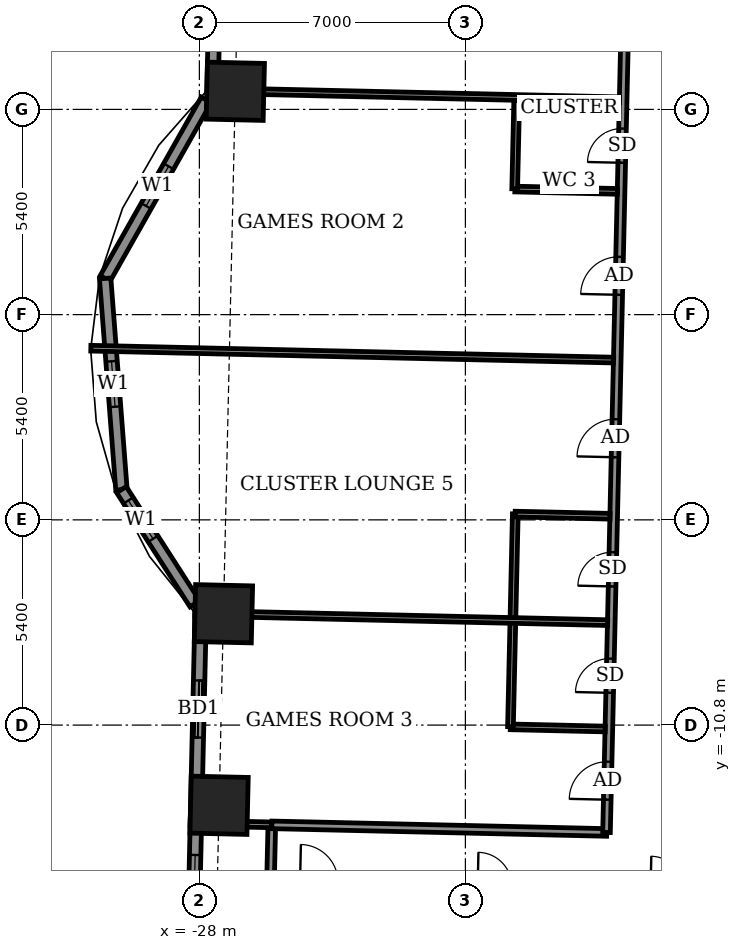
"""IFC4 building model, lengths in metres.
Left out: names, types, materials, properties, quantities, classifications, styles, units other than length and angle.
Written with IfcOpenShell. Run it as: python <this file> out.ifc"""

import sys

from ifc_helpers import new_model, si_unit, direction, frame, frame_2d, origin, origin_2d, place, context, subcontext, project, spatial, rectangle, extrude, element, fill, save


model = new_model("IFC4")
c1 = context("Model", 3, precision=1e-05, world=origin(), true_north=direction((0.0, 1.0)))
c2 = subcontext(c1, "Body", "Model", "MODEL_VIEW")
j1 = project(units=[si_unit("LENGTHUNIT", "METRE"), si_unit("PLANEANGLEUNIT", "RADIAN")], contexts=[c1])
p1 = place(None, origin())
s1 = spatial("IfcSite", under=j1, at=p1, CompositionType="ELEMENT")
p2 = place(p1, origin())
s2 = spatial("IfcBuilding", under=s1, at=p2, CompositionType="ELEMENT")
p3 = place(p2, frame((0.0, 0.0, 56.7)))
s3 = spatial("IfcBuildingStorey", under=s2, at=p3, CompositionType="ELEMENT", Elevation=56.7)
for number, where, z_axis, x_axis in (
    (1, (-27.366, -7.87, -0.55), (0.0, 0.0, 1.0), (-0.023, -1.0, 0.0)),
    (2, (-27.481, -12.91, -0.55), (0.0, 0.0, 1.0), (-0.023, -1.0, 0.0)),
    (3, (-27.054, 5.877, -0.55), (0.0, 0.0, 1.0), (-0.023, -1.0, 0.0)),
):
    element("IfcColumn", number, at=place(p3, frame(where, z_axis=z_axis, x_axis=x_axis)), inside=s3, PredefinedType="COLUMN", context=c2, shape_type="SweptSolid", body=[
        extrude(rectangle(XDim=1.5, YDim=1.5, at=origin_2d()), origin(), (0.0, 0.0, 1.0), 3.6),
    ])
p4 = place(p3, frame((-27.324, 20.462, 0.0), z_axis=(0.0, 0.0, 1.0), x_axis=(-0.022695628174, -0.999742421057, 0.0)))
e4 = element("IfcWall", 4, at=p4, inside=s3, PredefinedType="SOLIDWALL", context=c2, shape_type="SweptSolid", body=[
    extrude(rectangle(XDim=14.63, YDim=0.3, at=frame_2d((7.315, 0.0))), origin(), (0.0, 0.0, 1.0), 3.05),
])
p5 = place(p4, frame((3.13, 0.0, 0.0)))
e5 = element("IfcOpeningElement", 5, at=p5, cuts=e4, PredefinedType="OPENING", context=c2, shape_type="SweptSolid", body=[
    extrude(rectangle(XDim=1.5, YDim=2.4, at=frame_2d((0.75, 1.2))), frame((0.0, 0.16, 0.0), z_axis=(0.0, -1.0, 0.0), x_axis=(1.0, 0.0, 0.0)), (0.0, 0.0, 1.0), 0.32),
])
p6 = place(p4, frame((9.694, 0.0, 0.9)))
e6 = element("IfcOpeningElement", 6, at=p6, cuts=e4, PredefinedType="OPENING", context=c2, shape_type="SweptSolid", body=[
    extrude(rectangle(XDim=2.4, YDim=1.5, at=frame_2d((1.2, 0.75))), frame((0.0, 0.16, 0.0), z_axis=(0.0, -1.0, 0.0), x_axis=(1.0, 0.0, 0.0)), (0.0, 0.0, 1.0), 0.32),
])
p7 = place(p3, frame((-27.82, 5.65, 0.0), z_axis=(0.0, 0.0, 1.0), x_axis=(-0.492554919955, -0.870281363025, 0.0)))
e7 = element("IfcWall", 7, at=p7, inside=s3, PredefinedType="SOLIDWALL", context=c2, shape_type="SweptSolid", body=[
    extrude(rectangle(XDim=5.398, YDim=0.3, at=frame_2d((2.699, 0.0))), origin(), (0.0, 0.0, 1.0), 3.05),
])
p8 = place(p7, frame((2.008, 0.0, 0.9)))
e8 = element("IfcOpeningElement", 8, at=p8, cuts=e7, PredefinedType="OPENING", context=c2, shape_type="SweptSolid", body=[
    extrude(rectangle(XDim=1.2, YDim=1.5, at=frame_2d((0.6, 0.75))), frame((0.0, 0.16, 0.0), z_axis=(0.0, -1.0, 0.0), x_axis=(1.0, 0.0, 0.0)), (0.0, 0.0, 1.0), 0.32),
])
p9 = place(p3, frame((-30.479, 0.952, 0.0), z_axis=(0.0, 0.0, 1.0), x_axis=(0.076964476481, -0.997033835614, 0.0)))
e9 = element("IfcWall", 9, at=p9, inside=s3, PredefinedType="SOLIDWALL", context=c2, shape_type="SweptSolid", body=[
    extrude(rectangle(XDim=5.573, YDim=0.3, at=frame_2d((2.787, 0.0))), origin(), (0.0, 0.0, 1.0), 3.05),
])
p10 = place(p9, frame((2.186, 0.0, 0.9)))
e10 = element("IfcOpeningElement", 10, at=p10, cuts=e9, PredefinedType="OPENING", context=c2, shape_type="SweptSolid", body=[
    extrude(rectangle(XDim=1.2, YDim=1.5, at=frame_2d((0.6, 0.75))), frame((0.0, 0.16, 0.0), z_axis=(0.0, -1.0, 0.0), x_axis=(1.0, 0.0, 0.0)), (0.0, 0.0, 1.0), 0.32),
])
p11 = place(p3, frame((-30.05, -4.605, 0.0), z_axis=(0.0, 0.0, 1.0), x_axis=(0.540653885242, -0.841245134532, 0.0)))
e11 = element("IfcWall", 11, at=p11, inside=s3, PredefinedType="SOLIDWALL", context=c2, shape_type="SweptSolid", body=[
    extrude(rectangle(XDim=3.57, YDim=0.3, at=frame_2d((1.785, 0.0))), origin(), (0.0, 0.0, 1.0), 3.05),
])
p12 = place(p11, frame((0.338, 0.0, 0.9)))
e12 = element("IfcOpeningElement", 12, at=p12, cuts=e11, PredefinedType="OPENING", context=c2, shape_type="SweptSolid", body=[
    extrude(rectangle(XDim=1.2, YDim=1.5, at=frame_2d((0.6, 0.75))), frame((0.0, 0.16, 0.0), z_axis=(0.0, -1.0, 0.0), x_axis=(1.0, 0.0, 0.0)), (0.0, 0.0, 1.0), 0.32),
])
p13 = place(p3, frame((-27.965, -7.802, 0.0), z_axis=(0.0, 0.0, 1.0), x_axis=(-0.02267786199, -0.999742824218, 0.0)))
e13 = element("IfcWall", 13, at=p13, inside=s3, PredefinedType="SOLIDWALL", context=c2, shape_type="SweptSolid", body=[
    extrude(rectangle(XDim=15.029, YDim=0.3, at=frame_2d((7.514, 0.0))), origin(), (0.0, 0.0, 1.0), 3.05),
])
p14 = place(p13, frame((1.826, 0.0, 0.0)))
e14 = element("IfcOpeningElement", 14, at=p14, cuts=e13, PredefinedType="OPENING", context=c2, shape_type="SweptSolid", body=[
    extrude(rectangle(XDim=1.5, YDim=2.4, at=frame_2d((0.75, 1.2))), frame((0.0, 0.16, 0.0), z_axis=(0.0, -1.0, 0.0), x_axis=(1.0, 0.0, 0.0)), (0.0, 0.0, 1.0), 0.32),
])
p15 = place(p13, frame((6.417, 0.0, 0.9)))
e15 = element("IfcOpeningElement", 15, at=p15, cuts=e13, PredefinedType="OPENING", context=c2, shape_type="SweptSolid", body=[
    extrude(rectangle(XDim=2.4, YDim=1.5, at=frame_2d((1.2, 0.75))), frame((0.0, 0.16, 0.0), z_axis=(0.0, -1.0, 0.0), x_axis=(1.0, 0.0, 0.0)), (0.0, 0.0, 1.0), 0.32),
])
p16 = place(p3, frame((-30.413, 6.204, 0.0), z_axis=(0.0, 0.0, 1.0), x_axis=(0.022745736617, 0.999741282265, 0.0)))
e16 = element("IfcWall", 16, at=p16, inside=s3, PredefinedType="USERDEFINED", context=c2, shape_type="SweptSolid", body=[
    extrude(rectangle(XDim=3.875, YDim=0.55, at=frame_2d((1.938, 0.0))), origin(), (0.0, 0.0, 1.0), 0.8),
])
p17 = place(p3, frame((-30.915, -15.916, 0.0), z_axis=(0.0, 0.0, 1.0), x_axis=(0.022662255828, 0.999743178102, 0.0)))
e17 = element("IfcWall", 17, at=p17, inside=s3, PredefinedType="USERDEFINED", context=c2, shape_type="SweptSolid", body=[
    extrude(rectangle(XDim=6.0, YDim=0.55, at=frame_2d((3.0, 0.0))), origin(), (0.0, 0.0, 1.0), 0.8),
])
p18 = place(p3, frame((-26.128, -14.924, 0.0), z_axis=(0.0, 0.0, 1.0), x_axis=(0.022632637625, 0.99974384905, 0.0)))
e18 = element("IfcWall", 18, at=p18, inside=s3, PredefinedType="PARTITIONING", context=c2, shape_type="SweptSolid", body=[
    extrude(rectangle(XDim=1.5, YDim=0.2, at=frame_2d((0.75, 0.0))), origin(), (0.0, 0.0, 1.0), 3.05),
])
p19 = place(p3, frame((-28.242, -13.376, 0.0), z_axis=(0.0, 0.0, 1.0), x_axis=(0.999739603527, -0.022819402715, 0.0)))
e19 = element("IfcWall", 19, at=p19, inside=s3, PredefinedType="PARTITIONING", context=c2, shape_type="SweptSolid", body=[
    extrude(rectangle(XDim=2.15, YDim=0.15, at=frame_2d((1.075, 0.0))), origin(), (0.0, 0.0, 1.0), 3.05),
])
p20 = place(p3, frame((-26.092, -13.425, 0.0), z_axis=(0.0, 0.0, 1.0), x_axis=(0.999742550188, -0.022689939273, 0.0)))
e20 = element("IfcWall", 20, at=p20, inside=s3, PredefinedType="PARTITIONING", context=c2, shape_type="SweptSolid", body=[
    extrude(rectangle(XDim=8.812, YDim=0.2, at=frame_2d((4.406, 0.0))), origin(), (0.0, 0.0, 1.0), 3.05),
])
p21 = place(p3, frame((-17.287, -13.625, 0.0), z_axis=(0.0, 0.0, 1.0), x_axis=(0.022712214871, 0.999742044377, 0.0)))
e21 = element("IfcWall", 21, at=p21, inside=s3, PredefinedType="PARTITIONING", context=c2, shape_type="SweptSolid", body=[
    extrude(rectangle(XDim=26.551, YDim=0.2, at=frame_2d((13.275, 0.0))), origin(), (0.0, 0.0, 1.0), 3.05),
])
p22 = place(p21, frame((14.15, 0.0, 0.0)))
e22 = element("IfcOpeningElement", 22, at=p22, cuts=e21, PredefinedType="OPENING", context=c2, shape_type="SweptSolid", body=[
    extrude(rectangle(XDim=1.0, YDim=2.1, at=frame_2d((0.5, 1.05))), frame((0.0, 0.11, 0.0), z_axis=(0.0, -1.0, 0.0), x_axis=(1.0, 0.0, 0.0)), (0.0, 0.0, 1.0), 0.22),
])
p23 = place(p21, frame((17.625, 0.0, 0.0)))
e23 = element("IfcOpeningElement", 23, at=p23, cuts=e21, PredefinedType="OPENING", context=c2, shape_type="SweptSolid", body=[
    extrude(rectangle(XDim=0.9, YDim=2.1, at=frame_2d((0.45, 1.05))), frame((0.0, 0.11, 0.0), z_axis=(0.0, -1.0, 0.0), x_axis=(1.0, 0.0, 0.0)), (0.0, 0.0, 1.0), 0.22),
])
p24 = place(p21, frame((9.875, 0.0, 0.0)))
e24 = element("IfcOpeningElement", 24, at=p24, cuts=e21, PredefinedType="OPENING", context=c2, shape_type="SweptSolid", body=[
    extrude(rectangle(XDim=1.0, YDim=2.1, at=frame_2d((0.5, 1.05))), frame((0.0, 0.11, 0.0), z_axis=(0.0, -1.0, 0.0), x_axis=(1.0, 0.0, 0.0)), (0.0, 0.0, 1.0), 0.22),
])
p25 = place(p21, frame((6.475, 0.0, 0.0)))
e25 = element("IfcOpeningElement", 25, at=p25, cuts=e21, PredefinedType="OPENING", context=c2, shape_type="SweptSolid", body=[
    extrude(rectangle(XDim=0.9, YDim=2.1, at=frame_2d((0.45, 1.05))), frame((0.0, 0.11, 0.0), z_axis=(0.0, -1.0, 0.0), x_axis=(1.0, 0.0, 0.0)), (0.0, 0.0, 1.0), 0.22),
])
p26 = place(p21, frame((0.862, 0.0, 0.0)))
e26 = element("IfcOpeningElement", 26, at=p26, cuts=e21, PredefinedType="OPENING", context=c2, shape_type="SweptSolid", body=[
    extrude(rectangle(XDim=1.0, YDim=2.1, at=frame_2d((0.5, 1.05))), frame((0.0, 0.11, 0.0), z_axis=(0.0, -1.0, 0.0), x_axis=(1.0, 0.0, 0.0)), (0.0, 0.0, 1.0), 0.22),
])
p27 = place(p21, frame((3.675, 0.0, 0.0)))
e27 = element("IfcOpeningElement", 27, at=p27, cuts=e21, PredefinedType="OPENING", context=c2, shape_type="SweptSolid", body=[
    extrude(rectangle(XDim=0.9, YDim=2.1, at=frame_2d((0.45, 1.05))), frame((0.0, 0.11, 0.0), z_axis=(0.0, -1.0, 0.0), x_axis=(1.0, 0.0, 0.0)), (0.0, 0.0, 1.0), 0.22),
])
p28 = place(p3, frame((-19.819, -10.846, 0.0), z_axis=(0.0, 0.0, 1.0), x_axis=(0.999738801317, -0.022854521249, 0.0)))
e28 = element("IfcWall", 28, at=p28, inside=s3, PredefinedType="PARTITIONING", context=c2, shape_type="SweptSolid", body=[
    extrude(rectangle(XDim=2.5, YDim=0.15, at=frame_2d((1.25, 0.0))), origin(), (0.0, 0.0, 1.0), 3.05),
])
p29 = place(p3, frame((-19.814, -10.842, 0.0), z_axis=(0.0, 0.0, 1.0), x_axis=(0.022667933447, 0.999743049385, 0.0)))
e29 = element("IfcWall", 29, at=p29, inside=s3, PredefinedType="PARTITIONING", context=c2, shape_type="SweptSolid", body=[
    extrude(rectangle(XDim=5.601, YDim=0.15, at=frame_2d((2.8, 0.0))), origin(), (0.0, 0.0, 1.0), 3.05),
])
p30 = place(p3, frame((-28.116, -7.857, 0.0), z_axis=(0.0, 0.0, 1.0), x_axis=(0.999741301527, -0.022744890004, 0.0)))
e30 = element("IfcWall", 30, at=p30, inside=s3, PredefinedType="PARTITIONING", context=c2, shape_type="SweptSolid", body=[
    extrude(rectangle(XDim=10.863, YDim=0.15, at=frame_2d((5.431, 0.0))), origin(), (0.0, 0.0, 1.0), 3.05),
])
p31 = place(p3, frame((-19.692, -5.248, 0.0), z_axis=(0.0, 0.0, 1.0), x_axis=(0.999740977561, -0.022759125332, 0.0)))
e31 = element("IfcWall", 31, at=p31, inside=s3, PredefinedType="PARTITIONING", context=c2, shape_type="SweptSolid", body=[
    extrude(rectangle(XDim=2.5, YDim=0.15, at=frame_2d((1.25, 0.0))), origin(), (0.0, 0.0, 1.0), 3.05),
])
p32 = place(p3, frame((-30.856, -0.883, 0.0), z_axis=(0.0, 0.0, 1.0), x_axis=(0.999741248952, -0.022747200787, 0.0)))
e32 = element("IfcWall", 32, at=p32, inside=s3, PredefinedType="PARTITIONING", context=c2, shape_type="SweptSolid", body=[
    extrude(rectangle(XDim=13.76, YDim=0.15, at=frame_2d((6.88, 0.0))), origin(), (0.0, 0.0, 1.0), 2.1),
])
p33 = place(p3, frame((-19.698, 3.304, 0.0), z_axis=(0.0, 0.0, 1.0), x_axis=(0.999744396973, -0.02260842146, 0.0)))
e33 = element("IfcWall", 33, at=p33, inside=s3, PredefinedType="PARTITIONING", context=c2, shape_type="SweptSolid", body=[
    extrude(rectangle(XDim=2.7, YDim=0.15, at=frame_2d((1.35, 0.0))), origin(), (0.0, 0.0, 1.0), 3.05),
])
p34 = place(p3, frame((-19.703, 3.31, 0.0), z_axis=(0.0, 0.0, 1.0), x_axis=(0.02279059109, 0.999740260747, 0.0)))
e34 = element("IfcWall", 34, at=p34, inside=s3, PredefinedType="PARTITIONING", context=c2, shape_type="SweptSolid", body=[
    extrude(rectangle(XDim=2.324, YDim=0.15, at=frame_2d((1.162, 0.0))), origin(), (0.0, 0.0, 1.0), 3.05),
])
p35 = place(p3, frame((-27.505, 5.892, 0.0), z_axis=(0.0, 0.0, 1.0), x_axis=(0.999743990669, -0.022626381091, 0.0)))
e35 = element("IfcWall", 35, at=p35, inside=s3, PredefinedType="PARTITIONING", context=c2, shape_type="SweptSolid", body=[
    extrude(rectangle(XDim=10.563, YDim=0.15, at=frame_2d((5.282, 0.0))), origin(), (0.0, 0.0, 1.0), 3.05),
])
p36 = place(p8, origin())
e36 = element("IfcWindow", 36, at=p36, inside=s3, PartitioningType="SINGLE_PANEL", PredefinedType="WINDOW", context=c2, shape_type="SweptSolid", body=[
    extrude(rectangle(XDim=1.2, YDim=1.5, at=frame_2d((0.6, 0.75))), frame((0.0, 0.03, 0.0), z_axis=(0.0, -1.0, 0.0), x_axis=(1.0, 0.0, 0.0)), (0.0, 0.0, 1.0), 0.06),
])
fill(e8, e36)
p37 = place(p10, origin())
e37 = element("IfcWindow", 37, at=p37, inside=s3, PartitioningType="SINGLE_PANEL", PredefinedType="WINDOW", context=c2, shape_type="SweptSolid", body=[
    extrude(rectangle(XDim=1.2, YDim=1.5, at=frame_2d((0.6, 0.75))), frame((0.0, 0.03, 0.0), z_axis=(0.0, -1.0, 0.0), x_axis=(1.0, 0.0, 0.0)), (0.0, 0.0, 1.0), 0.06),
])
fill(e10, e37)
p38 = place(p12, origin())
e38 = element("IfcWindow", 38, at=p38, inside=s3, PartitioningType="SINGLE_PANEL", PredefinedType="WINDOW", context=c2, shape_type="SweptSolid", body=[
    extrude(rectangle(XDim=1.2, YDim=1.5, at=frame_2d((0.6, 0.75))), frame((0.0, 0.03, 0.0), z_axis=(0.0, -1.0, 0.0), x_axis=(1.0, 0.0, 0.0)), (0.0, 0.0, 1.0), 0.06),
])
fill(e12, e38)
p39 = place(p14, origin())
e39 = element("IfcDoor", 39, at=p39, inside=s3, OperationType="SLIDING_TO_LEFT", PredefinedType="DOOR", context=c2, shape_type="SweptSolid", body=[
    extrude(rectangle(XDim=1.5, YDim=2.4, at=frame_2d((0.75, 1.2))), frame((0.0, 0.025, 0.0), z_axis=(0.0, -1.0, 0.0), x_axis=(1.0, 0.0, 0.0)), (0.0, 0.0, 1.0), 0.05),
])
fill(e14, e39)
p40 = place(p15, origin())
e40 = element("IfcWindow", 40, at=p40, inside=s3, PartitioningType="DOUBLE_PANEL_VERTICAL", PredefinedType="WINDOW", context=c2, shape_type="SweptSolid", body=[
    extrude(rectangle(XDim=2.4, YDim=1.5, at=frame_2d((1.2, 0.75))), frame((0.0, 0.03, 0.0), z_axis=(0.0, -1.0, 0.0), x_axis=(1.0, 0.0, 0.0)), (0.0, 0.0, 1.0), 0.06),
])
fill(e15, e40)
p41 = place(p22, origin())
e41 = element("IfcDoor", 41, at=p41, inside=s3, OperationType="SINGLE_SWING_RIGHT", PredefinedType="DOOR", context=c2, shape_type="SweptSolid", body=[
    extrude(rectangle(XDim=1.0, YDim=2.1, at=frame_2d((0.5, 1.05))), frame((0.0, 0.025, 0.0), z_axis=(0.0, -1.0, 0.0), x_axis=(1.0, 0.0, 0.0)), (0.0, 0.0, 1.0), 0.05),
])
fill(e22, e41)
p42 = place(p23, origin())
e42 = element("IfcDoor", 42, at=p42, inside=s3, OperationType="SINGLE_SWING_LEFT", PredefinedType="DOOR", context=c2, shape_type="SweptSolid", body=[
    extrude(rectangle(XDim=0.9, YDim=2.1, at=frame_2d((0.45, 1.05))), frame((0.0, 0.025, 0.0), z_axis=(0.0, -1.0, 0.0), x_axis=(1.0, 0.0, 0.0)), (0.0, 0.0, 1.0), 0.05),
])
fill(e23, e42)
p43 = place(p24, origin())
e43 = element("IfcDoor", 43, at=p43, inside=s3, OperationType="SINGLE_SWING_LEFT", PredefinedType="DOOR", context=c2, shape_type="SweptSolid", body=[
    extrude(rectangle(XDim=1.0, YDim=2.1, at=frame_2d((0.5, 1.05))), frame((0.0, 0.025, 0.0), z_axis=(0.0, -1.0, 0.0), x_axis=(1.0, 0.0, 0.0)), (0.0, 0.0, 1.0), 0.05),
])
fill(e24, e43)
p44 = place(p25, origin())
e44 = element("IfcDoor", 44, at=p44, inside=s3, OperationType="SINGLE_SWING_RIGHT", PredefinedType="DOOR", context=c2, shape_type="SweptSolid", body=[
    extrude(rectangle(XDim=0.9, YDim=2.1, at=frame_2d((0.45, 1.05))), frame((0.0, 0.025, 0.0), z_axis=(0.0, -1.0, 0.0), x_axis=(1.0, 0.0, 0.0)), (0.0, 0.0, 1.0), 0.05),
])
fill(e25, e44)
p45 = place(p26, origin())
e45 = element("IfcDoor", 45, at=p45, inside=s3, OperationType="SINGLE_SWING_RIGHT", PredefinedType="DOOR", context=c2, shape_type="SweptSolid", body=[
    extrude(rectangle(XDim=1.0, YDim=2.1, at=frame_2d((0.5, 1.05))), frame((0.0, 0.025, 0.0), z_axis=(0.0, -1.0, 0.0), x_axis=(1.0, 0.0, 0.0)), (0.0, 0.0, 1.0), 0.05),
])
fill(e26, e45)
p46 = place(p27, origin())
e46 = element("IfcDoor", 46, at=p46, inside=s3, OperationType="SINGLE_SWING_LEFT", PredefinedType="DOOR", context=c2, shape_type="SweptSolid", body=[
    extrude(rectangle(XDim=0.9, YDim=2.1, at=frame_2d((0.45, 1.05))), frame((0.0, 0.025, 0.0), z_axis=(0.0, -1.0, 0.0), x_axis=(1.0, 0.0, 0.0)), (0.0, 0.0, 1.0), 0.05),
])
fill(e27, e46)
save(model, sys.argv[1])
